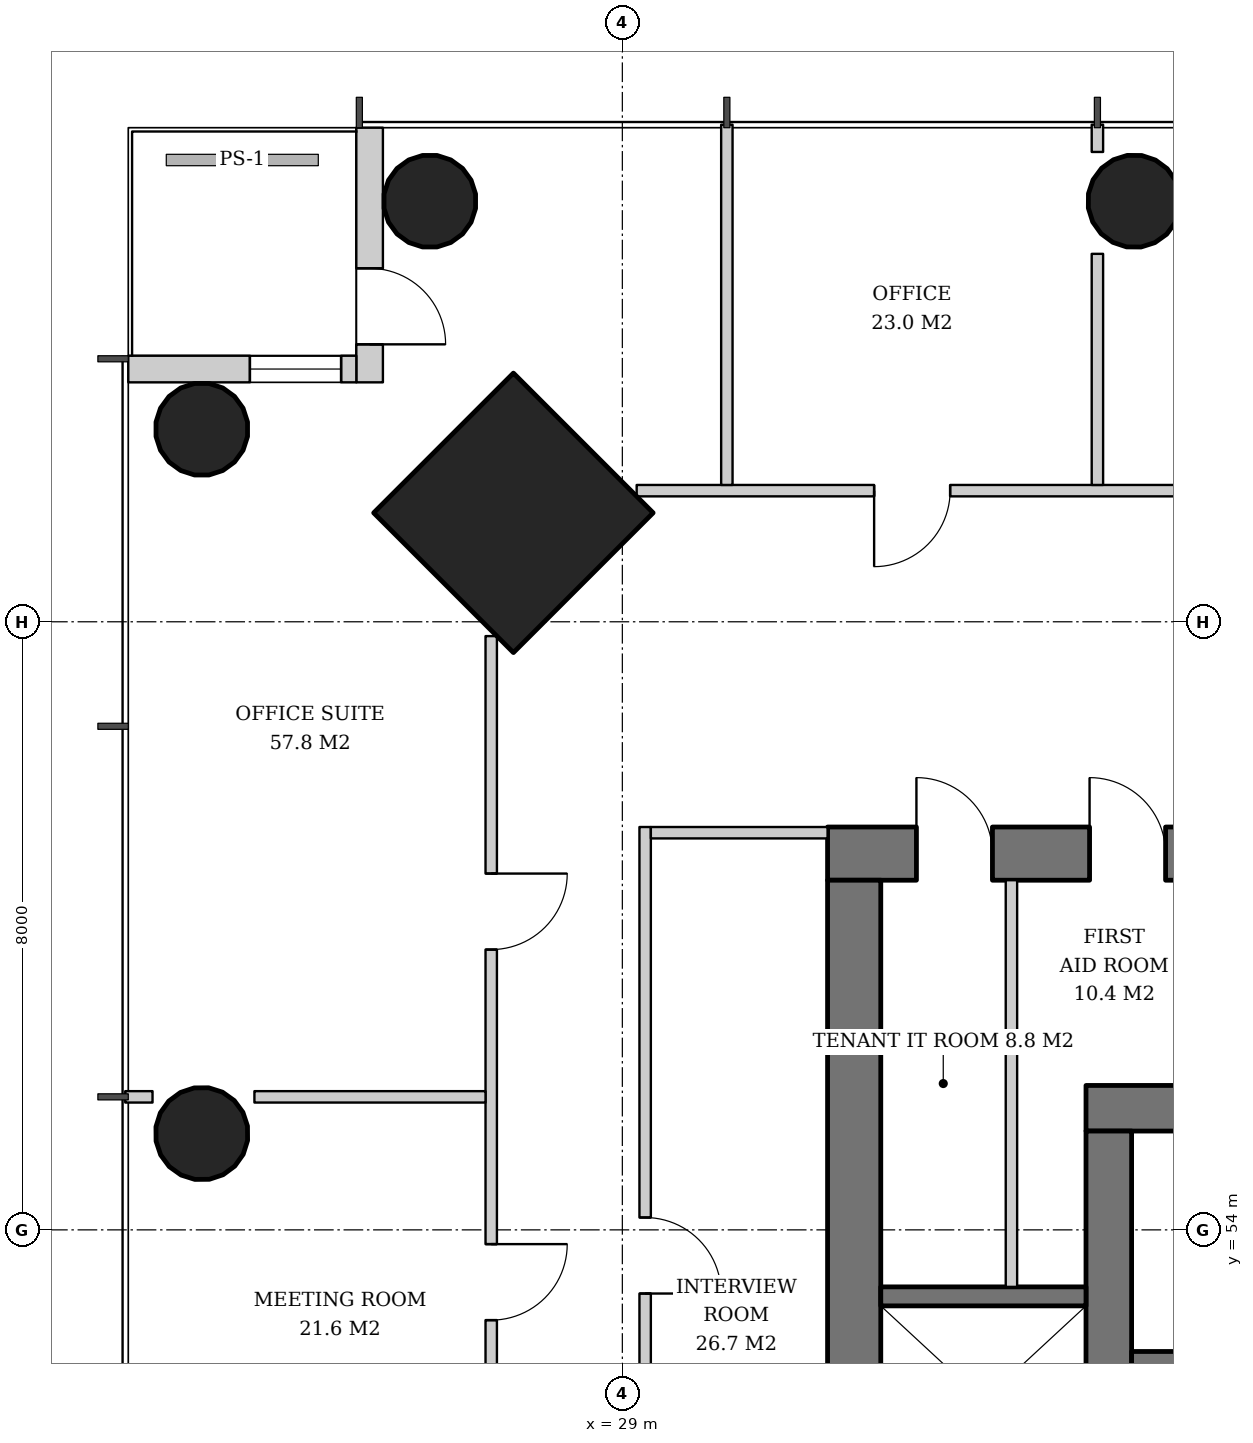
"""IFC4 building model, lengths in metres.
Left out: names, types, materials, properties, quantities, classifications, styles, units other than length and angle.
Written with IfcOpenShell. Run it as: python <this file> out.ifc"""

import sys

from ifc_helpers import new_model, si_unit, direction, frame, frame_2d, origin, origin_2d, place, context, subcontext, project, spatial, rectangle, hollow_circle, extrude, element, fill, save


model = new_model("IFC4")
c1 = context("Model", 3, precision=1e-05, world=origin(), true_north=direction((0.0, 1.0)))
c2 = subcontext(c1, "Body", "Model", "MODEL_VIEW")
j1 = project(units=[si_unit("LENGTHUNIT", "METRE"), si_unit("PLANEANGLEUNIT", "RADIAN")], contexts=[c1])
p1 = place(None, origin())
s1 = spatial("IfcSite", under=j1, at=p1, CompositionType="ELEMENT")
p2 = place(p1, origin())
s2 = spatial("IfcBuilding", under=s1, at=p2, CompositionType="ELEMENT")
p3 = place(p2, frame((0.0, 0.0, 97.0)))
s3 = spatial("IfcBuildingStorey", under=s2, at=p3, CompositionType="ELEMENT", Elevation=97.0)
p4 = place(p3, frame((27.529, 63.471, 0.0), z_axis=(0.031898107953, -0.031898107953, 0.998981992539), x_axis=(0.707106781187, 0.707106781187, 0.0)))
e1 = element("IfcColumn", 1, at=p4, inside=s3, PredefinedType="COLUMN", context=c2, shape_type="SweptSolid", body=[
    extrude(rectangle(XDim=2.6, YDim=2.6, at=origin_2d()), origin(), (0.0, 0.0, 1.0), 3.804),
])
p5 = place(p3, frame((26.428, 67.572, 0.0), z_axis=(0.031962158256, -0.031962158256, 0.998977898093), x_axis=(0.707106781187, 0.707106781187, 0.0)))
e2 = element("IfcColumn", 2, at=p5, inside=s3, PredefinedType="COLUMN", context=c2, shape_type="SweptSolid", body=[
    extrude(hollow_circle(Radius=0.61, WallThickness=0.04, at=origin_2d()), origin(), (0.0, 0.0, 1.0), 3.804),
])
p6 = place(p3, frame((35.714, 67.572, 0.0), z_axis=(0.015923015547, -0.031974442509, 0.999361842679), x_axis=(0.895145027055, 0.445775033553, 0.0)))
e3 = element("IfcColumn", 3, at=p6, inside=s3, PredefinedType="COLUMN", context=c2, shape_type="SweptSolid", body=[
    extrude(hollow_circle(Radius=0.61, WallThickness=0.04, at=origin_2d()), origin(), (0.0, 0.0, 1.0), 3.802),
])
p7 = place(p3, frame((23.428, 64.572, 0.0), z_axis=(0.031962158256, -0.031962158256, 0.998977898093), x_axis=(0.707106781187, 0.707106781187, 0.0)))
e4 = element("IfcColumn", 4, at=p7, inside=s3, PredefinedType="COLUMN", context=c2, shape_type="SweptSolid", body=[
    extrude(hollow_circle(Radius=0.61, WallThickness=0.04, at=origin_2d()), origin(), (0.0, 0.0, 1.0), 3.804),
])
p8 = place(p3, frame((23.428, 55.286, 0.0), z_axis=(0.031974442509, -0.015923015547, 0.999361842679), x_axis=(0.445775033553, 0.895145027055, 0.0)))
e5 = element("IfcColumn", 5, at=p8, inside=s3, PredefinedType="COLUMN", context=c2, shape_type="SweptSolid", body=[
    extrude(hollow_circle(Radius=0.61, WallThickness=0.04, at=origin_2d()), origin(), (0.0, 0.0, 1.0), 3.802),
])
p9 = place(p3, frame((35.1, 55.6, 0.0), z_axis=(0.0, 0.0, 1.0), x_axis=(1.0, 0.0, 0.0)))
e6 = element("IfcWall", 6, at=p9, inside=s3, PredefinedType="SHEAR", context=c2, shape_type="SweptSolid", body=[
    extrude(rectangle(XDim=19.8, YDim=0.6, at=frame_2d((9.9, 0.0))), origin(), (0.0, 0.0, 1.0), 3.8),
])
p10 = place(p9, frame((14.54, 0.0, 0.0)))
e7 = element("IfcOpeningElement", 7, at=p10, cuts=e6, PredefinedType="OPENING", context=c2, shape_type="SweptSolid", body=[
    extrude(rectangle(XDim=1.0, YDim=2.1, at=frame_2d((0.5, 1.05))), frame((0.0, 0.31, 0.0), z_axis=(0.0, -1.0, 0.0), x_axis=(1.0, 0.0, 0.0)), (0.0, 0.0, 1.0), 0.62),
])
p11 = place(p9, frame((2.425, 0.0, 0.0)))
e8 = element("IfcOpeningElement", 8, at=p11, cuts=e6, PredefinedType="OPENING", context=c2, shape_type="SweptSolid", body=[
    extrude(rectangle(XDim=1.0, YDim=2.1, at=frame_2d((0.5, 1.05))), frame((0.0, 0.31, 0.0), z_axis=(0.0, -1.0, 0.0), x_axis=(1.0, 0.0, 0.0)), (0.0, 0.0, 1.0), 0.62),
])
p12 = place(p3, frame((35.4, 36.7, 0.0), z_axis=(0.0, 0.0, 1.0), x_axis=(0.0, 1.0, 0.0)))
e9 = element("IfcWall", 9, at=p12, inside=s3, PredefinedType="SHEAR", context=c2, shape_type="SweptSolid", body=[
    extrude(rectangle(XDim=18.6, YDim=0.6, at=frame_2d((9.3, 0.0))), origin(), (0.0, 0.0, 1.0), 3.8),
])
p13 = place(p12, frame((8.4, 0.0, 0.0)))
e10 = element("IfcOpeningElement", 10, at=p13, cuts=e9, PredefinedType="OPENING", context=c2, shape_type="SweptSolid", body=[
    extrude(rectangle(XDim=1.8, YDim=2.4, at=frame_2d((0.9, 1.2))), frame((0.0, 0.31, 0.0), z_axis=(0.0, -1.0, 0.0), x_axis=(1.0, 0.0, 0.0)), (0.0, 0.0, 1.0), 0.62),
])
p14 = place(p3, frame((31.7, 58.95, 0.0), z_axis=(0.0, 0.0, 1.0), x_axis=(1.0, 0.0, 0.0)))
e11 = element("IfcWall", 11, at=p14, inside=s3, PredefinedType="SHEAR", context=c2, shape_type="SweptSolid", body=[
    extrude(rectangle(XDim=26.6, YDim=0.7, at=frame_2d((13.3, 0.0))), origin(), (0.0, 0.0, 1.0), 3.8),
])
p15 = place(p14, frame((17.94, 0.0, 0.0)))
e12 = element("IfcOpeningElement", 12, at=p15, cuts=e11, PredefinedType="OPENING", context=c2, shape_type="SweptSolid", body=[
    extrude(rectangle(XDim=1.0, YDim=2.1, at=frame_2d((0.5, 1.05))), frame((0.0, 0.36, 0.0), z_axis=(0.0, -1.0, 0.0), x_axis=(1.0, 0.0, 0.0)), (0.0, 0.0, 1.0), 0.72),
])
p16 = place(p14, frame((5.825, 0.0, 0.0)))
e13 = element("IfcOpeningElement", 13, at=p16, cuts=e11, PredefinedType="OPENING", context=c2, shape_type="SweptSolid", body=[
    extrude(rectangle(XDim=1.0, YDim=2.1, at=frame_2d((0.5, 1.05))), frame((0.0, 0.36, 0.0), z_axis=(0.0, -1.0, 0.0), x_axis=(1.0, 0.0, 0.0)), (0.0, 0.0, 1.0), 0.72),
])
p17 = place(p14, frame((1.169, 0.0, 0.0)))
e14 = element("IfcOpeningElement", 14, at=p17, cuts=e11, PredefinedType="OPENING", context=c2, shape_type="SweptSolid", body=[
    extrude(rectangle(XDim=1.0, YDim=2.1, at=frame_2d((0.5, 1.05))), frame((0.0, 0.36, 0.0), z_axis=(0.0, -1.0, 0.0), x_axis=(1.0, 0.0, 0.0)), (0.0, 0.0, 1.0), 0.72),
])
p18 = place(p14, frame((3.447, 0.0, 0.0)))
e15 = element("IfcOpeningElement", 15, at=p18, cuts=e11, PredefinedType="OPENING", context=c2, shape_type="SweptSolid", body=[
    extrude(rectangle(XDim=1.0, YDim=2.1, at=frame_2d((0.5, 1.05))), frame((0.0, 0.36, 0.0), z_axis=(0.0, -1.0, 0.0), x_axis=(1.0, 0.0, 0.0)), (0.0, 0.0, 1.0), 0.72),
])
p19 = place(p14, frame((11.577, 0.0, 0.0)))
e16 = element("IfcOpeningElement", 16, at=p19, cuts=e11, PredefinedType="OPENING", context=c2, shape_type="SweptSolid", body=[
    extrude(rectangle(XDim=1.0, YDim=2.1, at=frame_2d((0.5, 1.05))), frame((0.0, 0.36, 0.0), z_axis=(0.0, -1.0, 0.0), x_axis=(1.0, 0.0, 0.0)), (0.0, 0.0, 1.0), 0.72),
])
p20 = place(p14, frame((20.9, 0.0, 0.0)))
e17 = element("IfcOpeningElement", 17, at=p20, cuts=e11, PredefinedType="OPENING", context=c2, shape_type="SweptSolid", body=[
    extrude(rectangle(XDim=1.0, YDim=2.1, at=frame_2d((0.5, 1.05))), frame((0.0, 0.36, 0.0), z_axis=(0.0, -1.0, 0.0), x_axis=(1.0, 0.0, 0.0)), (0.0, 0.0, 1.0), 0.72),
])
p21 = place(p14, frame((23.75, 0.0, 0.0)))
e18 = element("IfcOpeningElement", 18, at=p21, cuts=e11, PredefinedType="OPENING", context=c2, shape_type="SweptSolid", body=[
    extrude(rectangle(XDim=1.0, YDim=2.1, at=frame_2d((0.5, 1.05))), frame((0.0, 0.36, 0.0), z_axis=(0.0, -1.0, 0.0), x_axis=(1.0, 0.0, 0.0)), (0.0, 0.0, 1.0), 0.72),
])
p22 = place(p3, frame((32.05, 33.4, 0.0), z_axis=(0.0, 0.0, 1.0), x_axis=(0.0, 1.0, 0.0)))
e19 = element("IfcWall", 19, at=p22, inside=s3, PredefinedType="SHEAR", context=c2, shape_type="SweptSolid", body=[
    extrude(rectangle(XDim=25.2, YDim=0.7, at=frame_2d((12.6, 0.0))), origin(), (0.0, 0.0, 1.0), 3.8),
])
p23 = place(p22, frame((11.7, 0.0, 0.0)))
e20 = element("IfcOpeningElement", 20, at=p23, cuts=e19, PredefinedType="OPENING", context=c2, shape_type="SweptSolid", body=[
    extrude(rectangle(XDim=1.8, YDim=2.4, at=frame_2d((0.9, 1.2))), frame((0.0, 0.36, 0.0), z_axis=(0.0, -1.0, 0.0), x_axis=(1.0, 0.0, 0.0)), (0.0, 0.0, 1.0), 0.72),
])
p24 = place(p3, frame((35.7, 52.2, 0.0), z_axis=(0.0, 0.0, 1.0), x_axis=(1.0, 0.0, 0.0)))
e21 = element("IfcWall", 21, at=p24, inside=s3, PredefinedType="SHEAR", context=c2, shape_type="SweptSolid", body=[
    extrude(rectangle(XDim=18.6, YDim=0.4, at=frame_2d((9.3, 0.0))), origin(), (0.0, 0.0, 1.0), 3.8),
])
p25 = place(p3, frame((25.675, 68.5, 0.0), z_axis=(0.0, 0.0, 1.0), x_axis=(0.0, -1.0, 0.0)))
e22 = element("IfcWall", 22, at=p25, inside=s3, PredefinedType="SOLIDWALL", context=c2, shape_type="SweptSolid", body=[
    extrude(rectangle(XDim=3.35, YDim=0.35, at=frame_2d((1.675, 0.0))), origin(), (0.0, 0.0, 1.0), 3.62),
])
p26 = place(p25, frame((1.85, 0.0, 0.0)))
e23 = element("IfcOpeningElement", 23, at=p26, cuts=e22, PredefinedType="OPENING", context=c2, shape_type="SweptSolid", body=[
    extrude(rectangle(XDim=1.0, YDim=2.4, at=frame_2d((0.5, 1.2))), frame((0.0, 0.185, 0.0), z_axis=(0.0, -1.0, 0.0), x_axis=(1.0, 0.0, 0.0)), (0.0, 0.0, 1.0), 0.37),
])
p27 = place(p3, frame((25.5, 65.325, 0.0), z_axis=(0.0, 0.0, 1.0), x_axis=(-1.0, 0.0, 0.0)))
e24 = element("IfcWall", 24, at=p27, inside=s3, PredefinedType="SOLIDWALL", context=c2, shape_type="SweptSolid", body=[
    extrude(rectangle(XDim=3.0, YDim=0.35, at=frame_2d((1.5, 0.0))), origin(), (0.0, 0.0, 1.0), 3.62),
])
p28 = place(p27, frame((0.2, 0.0, 0.6)))
e25 = element("IfcOpeningElement", 25, at=p28, cuts=e24, PredefinedType="OPENING", context=c2, shape_type="SweptSolid", body=[
    extrude(rectangle(XDim=1.2, YDim=2.55, at=frame_2d((0.6, 1.275))), frame((0.0, 0.185, 0.0), z_axis=(0.0, -1.0, 0.0), x_axis=(1.0, 0.0, 0.0)), (0.0, 0.0, 1.0), 0.37),
])
p29 = place(p3, frame((32.4, 53.125, 0.0), z_axis=(0.0, 0.0, 1.0), x_axis=(1.0, 0.0, 0.0)))
e26 = element("IfcWall", 26, at=p29, inside=s3, PredefinedType="SHEAR", context=c2, shape_type="SweptSolid", body=[
    extrude(rectangle(XDim=2.7, YDim=0.25, at=frame_2d((1.35, 0.0))), origin(), (0.0, 0.0, 1.0), 3.8),
])
p30 = place(p3, frame((34.119, 53.25, 0.0), z_axis=(0.0, 0.0, 1.0), x_axis=(0.0, 1.0, 0.0)))
e27 = element("IfcWall", 27, at=p30, inside=s3, PredefinedType="SOLIDWALL", context=c2, shape_type="SweptSolid", body=[
    extrude(rectangle(XDim=5.35, YDim=0.15, at=frame_2d((2.675, 0.0))), origin(), (0.0, 0.0, 1.0), 3.62),
])
p31 = place(p3, frame((29.3, 59.3, 0.0), z_axis=(0.0, 0.0, 1.0), x_axis=(0.0, -1.0, 0.0)))
e28 = element("IfcWall", 28, at=p31, inside=s3, PredefinedType="PARTITIONING", context=c2, shape_type="SweptSolid", body=[
    extrude(rectangle(XDim=11.275, YDim=0.15, at=frame_2d((5.638, 0.0))), origin(), (0.0, 0.0, 1.0), 2.72),
])
p32 = place(p31, frame((5.137, 0.0, 0.0)))
e29 = element("IfcOpeningElement", 29, at=p32, cuts=e28, PredefinedType="OPENING", context=c2, shape_type="SweptSolid", body=[
    extrude(rectangle(XDim=1.0, YDim=2.1, at=frame_2d((0.5, 1.05))), frame((0.0, 0.085, 0.0), z_axis=(0.0, -1.0, 0.0), x_axis=(1.0, 0.0, 0.0)), (0.0, 0.0, 1.0), 0.17),
])
p33 = place(p3, frame((31.7, 59.225, 0.0), z_axis=(0.0, 0.0, 1.0), x_axis=(-1.0, 0.0, 0.0)))
e30 = element("IfcWall", 30, at=p33, inside=s3, PredefinedType="PARTITIONING", context=c2, shape_type="SweptSolid", body=[
    extrude(rectangle(XDim=2.325, YDim=0.15, at=frame_2d((1.163, 0.0))), origin(), (0.0, 0.0, 1.0), 3.62),
])
p34 = place(p3, frame((60.812, 63.725, 0.0), z_axis=(0.0, 0.0, 1.0), x_axis=(-1.0, 0.0, 0.0)))
e31 = element("IfcWall", 31, at=p34, inside=s3, PredefinedType="PARTITIONING", context=c2, shape_type="SweptSolid", body=[
    extrude(rectangle(XDim=31.623, YDim=0.15, at=frame_2d((15.812, 0.0))), origin(), (0.0, 0.0, 1.0), 2.72),
])
p35 = place(p34, frame((3.124, 0.0, 0.0)))
e32 = element("IfcOpeningElement", 32, at=p35, cuts=e31, PredefinedType="OPENING", context=c2, shape_type="SweptSolid", body=[
    extrude(rectangle(XDim=1.0, YDim=2.1, at=frame_2d((0.5, 1.05))), frame((0.0, 0.085, 0.0), z_axis=(0.0, -1.0, 0.0), x_axis=(1.0, 0.0, 0.0)), (0.0, 0.0, 1.0), 0.17),
])
p36 = place(p34, frame((7.999, 0.0, 0.0)))
e33 = element("IfcOpeningElement", 33, at=p36, cuts=e31, PredefinedType="OPENING", context=c2, shape_type="SweptSolid", body=[
    extrude(rectangle(XDim=1.0, YDim=2.1, at=frame_2d((0.5, 1.05))), frame((0.0, 0.085, 0.0), z_axis=(0.0, -1.0, 0.0), x_axis=(1.0, 0.0, 0.0)), (0.0, 0.0, 1.0), 0.17),
])
p37 = place(p34, frame((12.874, 0.0, 0.0)))
e34 = element("IfcOpeningElement", 34, at=p37, cuts=e31, PredefinedType="OPENING", context=c2, shape_type="SweptSolid", body=[
    extrude(rectangle(XDim=1.0, YDim=2.1, at=frame_2d((0.5, 1.05))), frame((0.0, 0.085, 0.0), z_axis=(0.0, -1.0, 0.0), x_axis=(1.0, 0.0, 0.0)), (0.0, 0.0, 1.0), 0.17),
])
p38 = place(p34, frame((17.749, 0.0, 0.0)))
e35 = element("IfcOpeningElement", 35, at=p38, cuts=e31, PredefinedType="OPENING", context=c2, shape_type="SweptSolid", body=[
    extrude(rectangle(XDim=1.0, YDim=2.1, at=frame_2d((0.5, 1.05))), frame((0.0, 0.085, 0.0), z_axis=(0.0, -1.0, 0.0), x_axis=(1.0, 0.0, 0.0)), (0.0, 0.0, 1.0), 0.17),
])
p39 = place(p34, frame((22.624, 0.0, 0.0)))
e36 = element("IfcOpeningElement", 36, at=p39, cuts=e31, PredefinedType="OPENING", context=c2, shape_type="SweptSolid", body=[
    extrude(rectangle(XDim=1.0, YDim=2.1, at=frame_2d((0.5, 1.05))), frame((0.0, 0.085, 0.0), z_axis=(0.0, -1.0, 0.0), x_axis=(1.0, 0.0, 0.0)), (0.0, 0.0, 1.0), 0.17),
])
p40 = place(p34, frame((27.499, 0.0, 0.0)))
e37 = element("IfcOpeningElement", 37, at=p40, cuts=e31, PredefinedType="OPENING", context=c2, shape_type="SweptSolid", body=[
    extrude(rectangle(XDim=1.0, YDim=2.1, at=frame_2d((0.5, 1.05))), frame((0.0, 0.085, 0.0), z_axis=(0.0, -1.0, 0.0), x_axis=(1.0, 0.0, 0.0)), (0.0, 0.0, 1.0), 0.17),
])
p41 = place(p3, frame((35.25, 63.8, 0.0), z_axis=(0.0, 0.0, 1.0), x_axis=(0.0, 1.0, 0.0)))
e38 = element("IfcWall", 38, at=p41, inside=s3, PredefinedType="PARTITIONING", context=c2, shape_type="SweptSolid", body=[
    extrude(rectangle(XDim=3.041, YDim=0.15, at=frame_2d((1.52, 0.0))), origin(), (0.0, 0.0, 1.0), 3.62),
])
p42 = place(p3, frame((35.25, 68.181, 0.0), z_axis=(0.0, 0.0, 1.0), x_axis=(0.0, 1.0, 0.0)))
e39 = element("IfcWall", 39, at=p42, inside=s3, PredefinedType="PARTITIONING", context=c2, shape_type="SweptSolid", body=[
    extrude(rectangle(XDim=0.359, YDim=0.15, at=frame_2d((0.18, 0.0))), origin(), (0.0, 0.0, 1.0), 3.62),
])
p43 = place(p3, frame((30.375, 63.8, 0.0), z_axis=(0.0, 0.0, 1.0), x_axis=(0.0, 1.0, 0.0)))
e40 = element("IfcWall", 40, at=p43, inside=s3, PredefinedType="PARTITIONING", context=c2, shape_type="SweptSolid", body=[
    extrude(rectangle(XDim=4.74, YDim=0.15, at=frame_2d((2.37, 0.0))), origin(), (0.0, 0.0, 1.0), 2.82),
])
p44 = place(p3, frame((27.275, 61.812, 0.0), z_axis=(0.0, 0.0, 1.0), x_axis=(0.0, -1.0, 0.0)))
e41 = element("IfcWall", 41, at=p44, inside=s3, PredefinedType="PARTITIONING", context=c2, shape_type="SweptSolid", body=[
    extrude(rectangle(XDim=31.623, YDim=0.15, at=frame_2d((15.812, 0.0))), origin(), (0.0, 0.0, 1.0), 2.72),
])
p45 = place(p44, frame((3.124, 0.0, 0.0)))
e42 = element("IfcOpeningElement", 42, at=p45, cuts=e41, PredefinedType="OPENING", context=c2, shape_type="SweptSolid", body=[
    extrude(rectangle(XDim=1.0, YDim=2.1, at=frame_2d((0.5, 1.05))), frame((0.0, 0.085, 0.0), z_axis=(0.0, -1.0, 0.0), x_axis=(1.0, 0.0, 0.0)), (0.0, 0.0, 1.0), 0.17),
])
p46 = place(p44, frame((7.999, 0.0, 0.0)))
e43 = element("IfcOpeningElement", 43, at=p46, cuts=e41, PredefinedType="OPENING", context=c2, shape_type="SweptSolid", body=[
    extrude(rectangle(XDim=1.0, YDim=2.1, at=frame_2d((0.5, 1.05))), frame((0.0, 0.085, 0.0), z_axis=(0.0, -1.0, 0.0), x_axis=(1.0, 0.0, 0.0)), (0.0, 0.0, 1.0), 0.17),
])
p47 = place(p44, frame((12.874, 0.0, 0.0)))
e44 = element("IfcOpeningElement", 44, at=p47, cuts=e41, PredefinedType="OPENING", context=c2, shape_type="SweptSolid", body=[
    extrude(rectangle(XDim=1.0, YDim=2.1, at=frame_2d((0.5, 1.05))), frame((0.0, 0.085, 0.0), z_axis=(0.0, -1.0, 0.0), x_axis=(1.0, 0.0, 0.0)), (0.0, 0.0, 1.0), 0.17),
])
p48 = place(p44, frame((17.849, 0.0, 0.0)))
e45 = element("IfcOpeningElement", 45, at=p48, cuts=e41, PredefinedType="OPENING", context=c2, shape_type="SweptSolid", body=[
    extrude(rectangle(XDim=0.8, YDim=2.1, at=frame_2d((0.4, 1.05))), frame((0.0, 0.085, 0.0), z_axis=(0.0, -1.0, 0.0), x_axis=(1.0, 0.0, 0.0)), (0.0, 0.0, 1.0), 0.17),
])
p49 = place(p44, frame((22.624, 0.0, 0.0)))
e46 = element("IfcOpeningElement", 46, at=p49, cuts=e41, PredefinedType="OPENING", context=c2, shape_type="SweptSolid", body=[
    extrude(rectangle(XDim=1.0, YDim=2.1, at=frame_2d((0.5, 1.05))), frame((0.0, 0.085, 0.0), z_axis=(0.0, -1.0, 0.0), x_axis=(1.0, 0.0, 0.0)), (0.0, 0.0, 1.0), 0.17),
])
p50 = place(p44, frame((27.599, 0.0, 0.0)))
e47 = element("IfcOpeningElement", 47, at=p50, cuts=e41, PredefinedType="OPENING", context=c2, shape_type="SweptSolid", body=[
    extrude(rectangle(XDim=0.8, YDim=2.1, at=frame_2d((0.4, 1.05))), frame((0.0, 0.085, 0.0), z_axis=(0.0, -1.0, 0.0), x_axis=(1.0, 0.0, 0.0)), (0.0, 0.0, 1.0), 0.17),
])
p51 = place(p3, frame((27.2, 55.75, 0.0), z_axis=(0.0, 0.0, 1.0), x_axis=(-1.0, 0.0, 0.0)))
e48 = element("IfcWall", 48, at=p51, inside=s3, PredefinedType="PARTITIONING", context=c2, shape_type="SweptSolid", body=[
    extrude(rectangle(XDim=3.041, YDim=0.15, at=frame_2d((1.52, 0.0))), origin(), (0.0, 0.0, 1.0), 3.62),
])
p52 = place(p3, frame((22.819, 55.75, 0.0), z_axis=(0.0, 0.0, 1.0), x_axis=(-1.0, 0.0, 0.0)))
e49 = element("IfcWall", 49, at=p52, inside=s3, PredefinedType="PARTITIONING", context=c2, shape_type="SweptSolid", body=[
    extrude(rectangle(XDim=0.359, YDim=0.15, at=frame_2d((0.18, 0.0))), origin(), (0.0, 0.0, 1.0), 3.62),
])
p53 = place(p26, origin())
e50 = element("IfcDoor", 50, at=p53, inside=s3, OperationType="SINGLE_SWING_RIGHT", PredefinedType="DOOR", context=c2, shape_type="SweptSolid", body=[
    extrude(rectangle(XDim=1.0, YDim=2.4, at=frame_2d((0.5, 1.2))), frame((0.0, 0.025, 0.0), z_axis=(0.0, -1.0, 0.0), x_axis=(1.0, 0.0, 0.0)), (0.0, 0.0, 1.0), 0.05),
])
fill(e23, e50)
p54 = place(p28, origin())
e51 = element("IfcWindow", 51, at=p54, inside=s3, PartitioningType="SINGLE_PANEL", PredefinedType="WINDOW", context=c2, shape_type="SweptSolid", body=[
    extrude(rectangle(XDim=1.2, YDim=2.55, at=frame_2d((0.6, 1.275))), frame((0.0, 0.03, 0.0), z_axis=(0.0, -1.0, 0.0), x_axis=(1.0, 0.0, 0.0)), (0.0, 0.0, 1.0), 0.06),
])
fill(e25, e51)
p55 = place(p17, origin())
e52 = element("IfcDoor", 52, at=p55, inside=s3, OperationType="SINGLE_SWING_LEFT", PredefinedType="DOOR", context=c2, shape_type="SweptSolid", body=[
    extrude(rectangle(XDim=1.0, YDim=2.1, at=frame_2d((0.5, 1.05))), frame((0.0, -0.29, 0.0), z_axis=(0.0, -1.0, 0.0), x_axis=(1.0, 0.0, 0.0)), (0.0, 0.0, 1.0), 0.05),
])
fill(e14, e52)
p56 = place(p18, origin())
e53 = element("IfcDoor", 53, at=p56, inside=s3, OperationType="SINGLE_SWING_LEFT", PredefinedType="DOOR", context=c2, shape_type="SweptSolid", body=[
    extrude(rectangle(XDim=1.0, YDim=2.1, at=frame_2d((0.5, 1.05))), frame((0.0, -0.29, 0.0), z_axis=(0.0, -1.0, 0.0), x_axis=(1.0, 0.0, 0.0)), (0.0, 0.0, 1.0), 0.05),
])
fill(e15, e53)
p57 = place(p32, origin())
e54 = element("IfcDoor", 54, at=p57, inside=s3, OperationType="SINGLE_SWING_RIGHT", PredefinedType="DOOR", context=c2, shape_type="SweptSolid", body=[
    extrude(rectangle(XDim=1.0, YDim=2.1, at=frame_2d((0.5, 1.05))), frame((0.0, 0.025, 0.0), z_axis=(0.0, -1.0, 0.0), x_axis=(1.0, 0.0, 0.0)), (0.0, 0.0, 1.0), 0.05),
])
fill(e29, e54)
p58 = place(p40, origin())
e55 = element("IfcDoor", 55, at=p58, inside=s3, OperationType="SINGLE_SWING_RIGHT", PredefinedType="DOOR", context=c2, shape_type="SweptSolid", body=[
    extrude(rectangle(XDim=1.0, YDim=2.1, at=frame_2d((0.5, 1.05))), frame((0.0, 0.025, 0.0), z_axis=(0.0, -1.0, 0.0), x_axis=(1.0, 0.0, 0.0)), (0.0, 0.0, 1.0), 0.05),
])
fill(e37, e55)
p59 = place(p45, origin())
e56 = element("IfcDoor", 56, at=p59, inside=s3, OperationType="SINGLE_SWING_LEFT", PredefinedType="DOOR", context=c2, shape_type="SweptSolid", body=[
    extrude(rectangle(XDim=1.0, YDim=2.1, at=frame_2d((0.5, 1.05))), frame((0.0, 0.025, 0.0), z_axis=(0.0, -1.0, 0.0), x_axis=(1.0, 0.0, 0.0)), (0.0, 0.0, 1.0), 0.05),
])
fill(e42, e56)
p60 = place(p46, origin())
e57 = element("IfcDoor", 57, at=p60, inside=s3, OperationType="SINGLE_SWING_LEFT", PredefinedType="DOOR", context=c2, shape_type="SweptSolid", body=[
    extrude(rectangle(XDim=1.0, YDim=2.1, at=frame_2d((0.5, 1.05))), frame((0.0, 0.025, 0.0), z_axis=(0.0, -1.0, 0.0), x_axis=(1.0, 0.0, 0.0)), (0.0, 0.0, 1.0), 0.05),
])
fill(e43, e57)
save(model, sys.argv[1])
